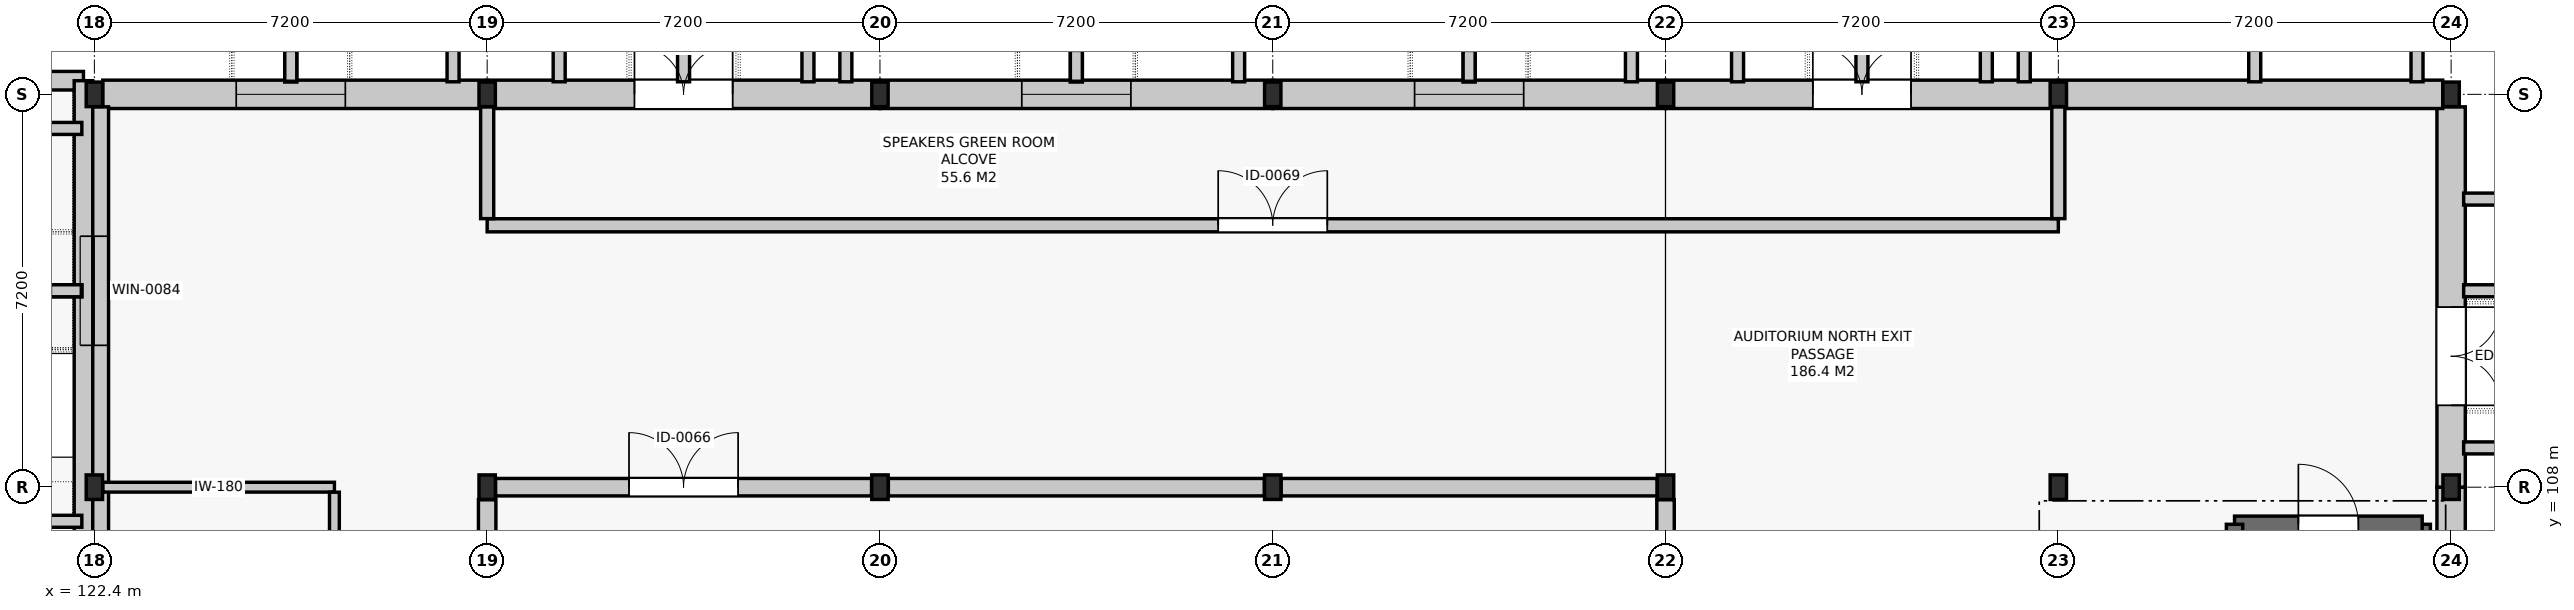
"""IFC4 building model, lengths in metres.
Left out: names, types, materials, properties, quantities, classifications, styles, units other than length and angle.
Written with IfcOpenShell. Run it as: python <this file> out.ifc"""

import sys

from ifc_helpers import new_model, si_unit, direction, frame, frame_2d, origin, origin_2d, place, context, subcontext, project, spatial, rectangle, i_section, extrude, element, fill, save


model = new_model("IFC4")
c1 = context("Model", 3, precision=1e-05, world=origin(), true_north=direction((0.0, 1.0)))
c2 = subcontext(c1, "Body", "Model", "MODEL_VIEW")
j1 = project(units=[si_unit("LENGTHUNIT", "METRE"), si_unit("PLANEANGLEUNIT", "RADIAN")], contexts=[c1])
p1 = place(None, origin())
s1 = spatial("IfcSite", under=j1, at=p1, CompositionType="ELEMENT")
p2 = place(p1, origin())
s2 = spatial("IfcBuilding", under=s1, at=p2, CompositionType="ELEMENT")
p3 = place(p2, origin())
s3 = spatial("IfcBuildingStorey", under=s2, at=p3, CompositionType="ELEMENT", Elevation=0.0)
for number, where, z_axis, x_axis in (
    (1, (122.4, 108.0, 0.0), (0.0, 0.0, 1.0), (1.0, 0.0, 0.0)),
    (2, (122.4, 115.2, 0.0), (0.0, 0.0, 1.0), (1.0, 0.0, 0.0)),
    (3, (129.6, 108.0, 0.0), (0.0, 0.0, 1.0), (1.0, 0.0, 0.0)),
    (4, (129.6, 115.2, 0.0), (0.0, 0.0, 1.0), (1.0, 0.0, 0.0)),
    (5, (136.8, 108.0, 0.0), (0.0, 0.0, 1.0), (1.0, 0.0, 0.0)),
    (6, (136.8, 115.2, 0.0), (0.0, 0.0, 1.0), (1.0, 0.0, 0.0)),
    (7, (144.0, 108.0, 0.0), (0.0, 0.0, 1.0), (1.0, 0.0, 0.0)),
    (8, (144.0, 115.2, 0.0), (0.0, 0.0, 1.0), (1.0, 0.0, 0.0)),
    (9, (151.2, 108.0, 0.0), (0.0, 0.0, 1.0), (1.0, 0.0, 0.0)),
    (10, (151.2, 115.2, 0.0), (0.0, 0.0, 1.0), (1.0, 0.0, 0.0)),
    (11, (158.4, 108.0, 0.0), (0.0, 0.0, 1.0), (1.0, 0.0, 0.0)),
    (12, (158.4, 115.2, 0.0), (0.0, 0.0, 1.0), (1.0, 0.0, 0.0)),
    (13, (165.6, 108.0, 0.0), (0.0, 0.0, 1.0), (1.0, 0.0, 0.0)),
    (14, (165.6, 115.2, 0.0), (0.0, 0.0, 1.0), (1.0, 0.0, 0.0)),
):
    element("IfcColumn", number, at=place(p3, frame(where, z_axis=z_axis, x_axis=x_axis)), inside=s3, PredefinedType="COLUMN", context=c2, shape_type="SweptSolid", body=[
        extrude(i_section(OverallWidth=0.3, OverallDepth=0.45, WebThickness=0.014, FlangeThickness=0.026, FilletRadius=0.027, at=origin_2d()), origin(), (0.0, 0.0, 1.0), 5.4),
    ])
p4 = place(p3, frame((165.6, 100.8, 0.0), z_axis=(0.0, 0.0, 1.0), x_axis=(0.0, 1.0, 0.0)))
e15 = element("IfcWall", 15, at=p4, inside=s3, PredefinedType="SOLIDWALL", context=c2, shape_type="SweptSolid", body=[
    extrude(rectangle(XDim=7.2, YDim=0.52, at=frame_2d((3.6, 0.0))), origin(), (0.0, 0.0, 1.0), 4.4),
])
p5 = place(p4, frame((2.6, 0.0, 1.35)))
e16 = element("IfcOpeningElement", 16, at=p5, cuts=e15, PredefinedType="OPENING", context=c2, shape_type="SweptSolid", body=[
    extrude(rectangle(XDim=2.0, YDim=1.5, at=frame_2d((1.0, 0.75))), frame((0.0, 0.272, 0.0), z_axis=(0.0, -1.0, 0.0), x_axis=(1.0, 0.0, 0.0)), (0.0, 0.0, 1.0), 0.544),
])
p6 = place(p3, frame((165.6, 108.0, 0.0), z_axis=(0.0, 0.0, 1.0), x_axis=(0.0, 1.0, 0.0)))
e17 = element("IfcWall", 17, at=p6, inside=s3, PredefinedType="SOLIDWALL", context=c2, shape_type="SweptSolid", body=[
    extrude(rectangle(XDim=6.971, YDim=0.52, at=frame_2d((3.485, 0.0))), origin(), (0.0, 0.0, 1.0), 4.4),
])
p7 = place(p6, frame((1.5, 0.0, 0.0)))
e18 = element("IfcOpeningElement", 18, at=p7, cuts=e17, PredefinedType="OPENING", context=c2, shape_type="SweptSolid", body=[
    extrude(rectangle(XDim=1.8, YDim=2.2, at=frame_2d((0.9, 1.1))), frame((0.0, 0.272, 0.0), z_axis=(0.0, -1.0, 0.0), x_axis=(1.0, 0.0, 0.0)), (0.0, 0.0, 1.0), 0.544),
])
p8 = place(p3, frame((165.446, 115.2, 0.0), z_axis=(0.0, 0.0, 1.0), x_axis=(-1.0, 0.0, 0.0)))
e19 = element("IfcWall", 19, at=p8, inside=s3, PredefinedType="SOLIDWALL", context=c2, shape_type="SweptSolid", body=[
    extrude(rectangle(XDim=7.046, YDim=0.52, at=frame_2d((3.523, 0.0))), origin(), (0.0, 0.0, 1.0), 4.4),
])
p9 = place(p3, frame((158.4, 115.2, 0.0), z_axis=(0.0, 0.0, 1.0), x_axis=(-1.0, 0.0, 0.0)))
e20 = element("IfcWall", 20, at=p9, inside=s3, PredefinedType="SOLIDWALL", context=c2, shape_type="SweptSolid", body=[
    extrude(rectangle(XDim=7.2, YDim=0.52, at=frame_2d((3.6, 0.0))), origin(), (0.0, 0.0, 1.0), 4.4),
])
p10 = place(p9, frame((2.7, 0.0, 0.0)))
e21 = element("IfcOpeningElement", 21, at=p10, cuts=e20, PredefinedType="OPENING", context=c2, shape_type="SweptSolid", body=[
    extrude(rectangle(XDim=1.8, YDim=2.2, at=frame_2d((0.9, 1.1))), frame((0.0, 0.272, 0.0), z_axis=(0.0, -1.0, 0.0), x_axis=(1.0, 0.0, 0.0)), (0.0, 0.0, 1.0), 0.544),
])
p11 = place(p3, frame((151.2, 115.2, 0.0), z_axis=(0.0, 0.0, 1.0), x_axis=(-1.0, 0.0, 0.0)))
e22 = element("IfcWall", 22, at=p11, inside=s3, PredefinedType="SOLIDWALL", context=c2, shape_type="SweptSolid", body=[
    extrude(rectangle(XDim=7.2, YDim=0.52, at=frame_2d((3.6, 0.0))), origin(), (0.0, 0.0, 1.0), 4.4),
])
p12 = place(p11, frame((2.6, 0.0, 1.35)))
e23 = element("IfcOpeningElement", 23, at=p12, cuts=e22, PredefinedType="OPENING", context=c2, shape_type="SweptSolid", body=[
    extrude(rectangle(XDim=2.0, YDim=1.5, at=frame_2d((1.0, 0.75))), frame((0.0, 0.272, 0.0), z_axis=(0.0, -1.0, 0.0), x_axis=(1.0, 0.0, 0.0)), (0.0, 0.0, 1.0), 0.544),
])
p13 = place(p3, frame((144.0, 115.2, 0.0), z_axis=(0.0, 0.0, 1.0), x_axis=(-1.0, 0.0, 0.0)))
e24 = element("IfcWall", 24, at=p13, inside=s3, PredefinedType="SOLIDWALL", context=c2, shape_type="SweptSolid", body=[
    extrude(rectangle(XDim=7.2, YDim=0.52, at=frame_2d((3.6, 0.0))), origin(), (0.0, 0.0, 1.0), 4.4),
])
p14 = place(p13, frame((2.6, 0.0, 1.35)))
e25 = element("IfcOpeningElement", 25, at=p14, cuts=e24, PredefinedType="OPENING", context=c2, shape_type="SweptSolid", body=[
    extrude(rectangle(XDim=2.0, YDim=1.5, at=frame_2d((1.0, 0.75))), frame((0.0, 0.272, 0.0), z_axis=(0.0, -1.0, 0.0), x_axis=(1.0, 0.0, 0.0)), (0.0, 0.0, 1.0), 0.544),
])
p15 = place(p3, frame((136.8, 115.2, 0.0), z_axis=(0.0, 0.0, 1.0), x_axis=(-1.0, 0.0, 0.0)))
e26 = element("IfcWall", 26, at=p15, inside=s3, PredefinedType="SOLIDWALL", context=c2, shape_type="SweptSolid", body=[
    extrude(rectangle(XDim=7.2, YDim=0.52, at=frame_2d((3.6, 0.0))), origin(), (0.0, 0.0, 1.0), 4.4),
])
p16 = place(p15, frame((2.7, 0.0, 0.0)))
e27 = element("IfcOpeningElement", 27, at=p16, cuts=e26, PredefinedType="OPENING", context=c2, shape_type="SweptSolid", body=[
    extrude(rectangle(XDim=1.8, YDim=2.2, at=frame_2d((0.9, 1.1))), frame((0.0, 0.272, 0.0), z_axis=(0.0, -1.0, 0.0), x_axis=(1.0, 0.0, 0.0)), (0.0, 0.0, 1.0), 0.544),
])
p17 = place(p3, frame((129.6, 115.2, 0.0), z_axis=(0.0, 0.0, 1.0), x_axis=(-1.0, 0.0, 0.0)))
e28 = element("IfcWall", 28, at=p17, inside=s3, PredefinedType="SOLIDWALL", context=c2, shape_type="SweptSolid", body=[
    extrude(rectangle(XDim=7.046, YDim=0.52, at=frame_2d((3.523, 0.0))), origin(), (0.0, 0.0, 1.0), 4.4),
])
p18 = place(p17, frame((2.6, 0.0, 1.35)))
e29 = element("IfcOpeningElement", 29, at=p18, cuts=e28, PredefinedType="OPENING", context=c2, shape_type="SweptSolid", body=[
    extrude(rectangle(XDim=2.0, YDim=1.5, at=frame_2d((1.0, 0.75))), frame((0.0, 0.272, 0.0), z_axis=(0.0, -1.0, 0.0), x_axis=(1.0, 0.0, 0.0)), (0.0, 0.0, 1.0), 0.544),
])
p19 = place(p3, frame((122.4, 114.971, 0.0), z_axis=(0.0, 0.0, 1.0), x_axis=(0.0, -1.0, 0.0)))
e30 = element("IfcWall", 30, at=p19, inside=s3, PredefinedType="SOLIDWALL", context=c2, shape_type="SweptSolid", body=[
    extrude(rectangle(XDim=6.971, YDim=0.52, at=frame_2d((3.485, 0.0))), origin(), (0.0, 0.0, 1.0), 4.4),
])
p20 = place(p19, frame((2.371, 0.0, 1.35)))
e31 = element("IfcOpeningElement", 31, at=p20, cuts=e30, PredefinedType="OPENING", context=c2, shape_type="SweptSolid", body=[
    extrude(rectangle(XDim=2.0, YDim=1.5, at=frame_2d((1.0, 0.75))), frame((0.0, 0.272, 0.0), z_axis=(0.0, -1.0, 0.0), x_axis=(1.0, 0.0, 0.0)), (0.0, 0.0, 1.0), 0.544),
])
p21 = place(p3, frame((122.4, 108.0, 0.0), z_axis=(0.0, 0.0, 1.0), x_axis=(0.0, -1.0, 0.0)))
e32 = element("IfcWall", 32, at=p21, inside=s3, PredefinedType="SOLIDWALL", context=c2, shape_type="SweptSolid", body=[
    extrude(rectangle(XDim=7.2, YDim=0.52, at=frame_2d((3.6, 0.0))), origin(), (0.0, 0.0, 1.0), 4.4),
])
p22 = place(p21, frame((2.6, 0.0, 1.35)))
e33 = element("IfcOpeningElement", 33, at=p22, cuts=e32, PredefinedType="OPENING", context=c2, shape_type="SweptSolid", body=[
    extrude(rectangle(XDim=2.0, YDim=1.5, at=frame_2d((1.0, 0.75))), frame((0.0, 0.272, 0.0), z_axis=(0.0, -1.0, 0.0), x_axis=(1.0, 0.0, 0.0)), (0.0, 0.0, 1.0), 0.544),
])
p23 = place(p3, frame((57.8, 115.45, -0.905), z_axis=(0.0, 0.0, 1.0), x_axis=(1.0, 0.0, 0.0)))
e34 = element("IfcWall", 34, at=p23, inside=s3, PredefinedType="SOLIDWALL", context=c2, shape_type="SweptSolid", body=[
    extrude(rectangle(XDim=64.4, YDim=0.34, at=frame_2d((32.2, 0.0))), origin(), (0.0, 0.0, 1.0), 0.225),
])
p24 = place(p3, frame((122.2, 86.6, -0.905), z_axis=(0.0, 0.0, 1.0), x_axis=(0.0, 1.0, 0.0)))
e35 = element("IfcWall", 35, at=p24, inside=s3, PredefinedType="SOLIDWALL", context=c2, shape_type="SweptSolid", body=[
    extrude(rectangle(XDim=28.85, YDim=0.34, at=frame_2d((14.425, 0.0))), origin(), (0.0, 0.0, 1.0), 0.905),
])
p25 = place(p3, frame((165.07, 100.38, 0.0), z_axis=(0.0, 0.0, 1.0), x_axis=(0.0, 1.0, 0.0)))
e36 = element("IfcWall", 36, at=p25, inside=s3, PredefinedType="SHEAR", context=c2, shape_type="SweptSolid", body=[
    extrude(rectangle(XDim=6.94, YDim=0.3, at=frame_2d((3.47, 0.0))), origin(), (0.0, 0.0, 1.0), 5.12),
])
p26 = place(p3, frame((165.07, 107.32, 0.0), z_axis=(0.0, 0.0, 1.0), x_axis=(-1.0, 0.0, 0.0)))
e37 = element("IfcWall", 37, at=p26, inside=s3, PredefinedType="SHEAR", context=c2, shape_type="SweptSolid", body=[
    extrude(rectangle(XDim=3.44, YDim=0.3, at=frame_2d((1.72, 0.0))), origin(), (0.0, 0.0, 1.0), 5.12),
])
p27 = place(p26, frame((1.17, 0.0, 0.0)))
e38 = element("IfcOpeningElement", 38, at=p27, cuts=e37, PredefinedType="OPENING", context=c2, shape_type="SweptSolid", body=[
    extrude(rectangle(XDim=1.1, YDim=2.15, at=frame_2d((0.55, 1.075))), frame((0.0, 0.162, 0.0), z_axis=(0.0, -1.0, 0.0), x_axis=(1.0, 0.0, 0.0)), (0.0, 0.0, 1.0), 0.324),
])
p28 = place(p3, frame((161.63, 107.32, 0.0), z_axis=(0.0, 0.0, 1.0), x_axis=(0.0, -1.0, 0.0)))
e39 = element("IfcWall", 39, at=p28, inside=s3, PredefinedType="SHEAR", context=c2, shape_type="SweptSolid", body=[
    extrude(rectangle(XDim=6.94, YDim=0.3, at=frame_2d((3.47, 0.0))), origin(), (0.0, 0.0, 1.0), 5.12),
])
p29 = place(p3, frame((129.754, 108.0, 0.0), z_axis=(0.0, 0.0, 1.0), x_axis=(1.0, 0.0, 0.0)))
e40 = element("IfcWall", 40, at=p29, inside=s3, PredefinedType="SOLIDWALL", context=c2, shape_type="SweptSolid", body=[
    extrude(rectangle(XDim=6.892, YDim=0.32, at=frame_2d((3.446, 0.0))), origin(), (0.0, 0.0, 1.0), 5.105),
])
p30 = place(p29, frame((2.446, 0.0, 0.0)))
e41 = element("IfcOpeningElement", 41, at=p30, cuts=e40, PredefinedType="OPENING", context=c2, shape_type="SweptSolid", body=[
    extrude(rectangle(XDim=2.0, YDim=2.4, at=frame_2d((1.0, 1.2))), frame((0.0, 0.172, 0.0), z_axis=(0.0, -1.0, 0.0), x_axis=(1.0, 0.0, 0.0)), (0.0, 0.0, 1.0), 0.344),
])
for number, where, z_axis, x_axis in (
    (42, (136.954, 108.0, 0.0), (0.0, 0.0, 1.0), (1.0, 0.0, 0.0)),
    (43, (144.154, 108.0, 0.0), (0.0, 0.0, 1.0), (1.0, 0.0, 0.0)),
):
    element("IfcWall", number, at=place(p3, frame(where, z_axis=z_axis, x_axis=x_axis)), inside=s3, PredefinedType="SOLIDWALL", context=c2, shape_type="SweptSolid", body=[
        extrude(rectangle(XDim=6.892, YDim=0.32, at=frame_2d((3.446, 0.0))), origin(), (0.0, 0.0, 1.0), 5.105),
    ])
p31 = place(p3, frame((122.554, 108.0, 0.0), z_axis=(0.0, 0.0, 1.0), x_axis=(1.0, 0.0, 0.0)))
e44 = element("IfcWall", 44, at=p31, inside=s3, PredefinedType="PARTITIONING", context=c2, shape_type="SweptSolid", body=[
    extrude(rectangle(XDim=4.246, YDim=0.18, at=frame_2d((2.123, 0.0))), origin(), (0.0, 0.0, 1.0), 4.615),
])
p32 = place(p3, frame((129.6, 112.8, 0.0), z_axis=(0.0, 0.0, 1.0), x_axis=(1.0, 0.0, 0.0)))
e45 = element("IfcWall", 45, at=p32, inside=s3, PredefinedType="SOLIDWALL", context=c2, shape_type="SweptSolid", body=[
    extrude(rectangle(XDim=28.8, YDim=0.24, at=frame_2d((14.4, 0.0))), origin(), (0.0, 0.0, 1.0), 4.665),
])
p33 = place(p32, frame((13.4, 0.0, 0.0)))
e46 = element("IfcOpeningElement", 46, at=p33, cuts=e45, PredefinedType="OPENING", context=c2, shape_type="SweptSolid", body=[
    extrude(rectangle(XDim=2.0, YDim=2.4, at=frame_2d((1.0, 1.2))), frame((0.0, 0.132, 0.0), z_axis=(0.0, -1.0, 0.0), x_axis=(1.0, 0.0, 0.0)), (0.0, 0.0, 1.0), 0.264),
])
for number, where, z_axis, x_axis in (
    (47, (129.6, 101.029, 0.0), (0.0, 0.0, 1.0), (0.0, 1.0, 0.0)),
    (48, (151.2, 101.029, 0.0), (0.0, 0.0, 1.0), (0.0, 1.0, 0.0)),
):
    element("IfcWall", number, at=place(p3, frame(where, z_axis=z_axis, x_axis=x_axis)), inside=s3, PredefinedType="SOLIDWALL", context=c2, shape_type="SweptSolid", body=[
        extrude(rectangle(XDim=6.742, YDim=0.32, at=frame_2d((3.371, 0.0))), origin(), (0.0, 0.0, 1.0), 5.105),
    ])
p34 = place(p3, frame((126.8, 99.477, 0.0), z_axis=(0.0, 0.0, 1.0), x_axis=(0.0, 1.0, 0.0)))
e49 = element("IfcWall", 49, at=p34, inside=s3, PredefinedType="PARTITIONING", context=c2, shape_type="SweptSolid", body=[
    extrude(rectangle(XDim=8.431, YDim=0.18, at=frame_2d((4.215, 0.0))), origin(), (0.0, 0.0, 1.0), 4.615),
])
p35 = place(p34, frame((3.515, 0.0, 0.0)))
e50 = element("IfcOpeningElement", 50, at=p35, cuts=e49, PredefinedType="OPENING", context=c2, shape_type="SweptSolid", body=[
    extrude(rectangle(XDim=1.4, YDim=2.2, at=frame_2d((0.7, 1.1))), frame((0.0, 0.102, 0.0), z_axis=(0.0, -1.0, 0.0), x_axis=(1.0, 0.0, 0.0)), (0.0, 0.0, 1.0), 0.204),
])
for number, where, z_axis, x_axis in (
    (51, (129.6, 112.922, 0.0), (0.0, 0.0, 1.0), (0.0, 1.0, 0.0)),
    (52, (158.4, 112.922, 0.0), (0.0, 0.0, 1.0), (0.0, 1.0, 0.0)),
):
    element("IfcWall", number, at=place(p3, frame(where, z_axis=z_axis, x_axis=x_axis)), inside=s3, PredefinedType="SOLIDWALL", context=c2, shape_type="SweptSolid", body=[
        extrude(rectangle(XDim=2.049, YDim=0.24, at=frame_2d((1.024, 0.0))), origin(), (0.0, 0.0, 1.0), 4.665),
    ])
p36 = place(p7, frame((1.8, 0.0, 0.0), z_axis=(0.0, 0.0, 1.0), x_axis=(-1.0, 0.0, 0.0)))
e53 = element("IfcDoor", 53, at=p36, inside=s3, OperationType="DOUBLE_DOOR_SINGLE_SWING", PredefinedType="DOOR", context=c2, shape_type="SweptSolid", body=[
    extrude(rectangle(XDim=1.8, YDim=2.2, at=frame_2d((0.9, 1.1))), frame((0.0, 0.025, 0.0), z_axis=(0.0, -1.0, 0.0), x_axis=(1.0, 0.0, 0.0)), (0.0, 0.0, 1.0), 0.05),
])
fill(e18, e53)
p37 = place(p10, frame((1.8, 0.0, 0.0), z_axis=(0.0, 0.0, 1.0), x_axis=(-1.0, 0.0, 0.0)))
e54 = element("IfcDoor", 54, at=p37, inside=s3, OperationType="DOUBLE_DOOR_SINGLE_SWING", PredefinedType="DOOR", context=c2, shape_type="SweptSolid", body=[
    extrude(rectangle(XDim=1.8, YDim=2.2, at=frame_2d((0.9, 1.1))), frame((0.0, 0.025, 0.0), z_axis=(0.0, -1.0, 0.0), x_axis=(1.0, 0.0, 0.0)), (0.0, 0.0, 1.0), 0.05),
])
fill(e21, e54)
p38 = place(p12, origin())
e55 = element("IfcWindow", 55, at=p38, inside=s3, PartitioningType="SINGLE_PANEL", PredefinedType="WINDOW", context=c2, shape_type="SweptSolid", body=[
    extrude(rectangle(XDim=2.0, YDim=1.5, at=frame_2d((1.0, 0.75))), frame((0.0, 0.03, 0.0), z_axis=(0.0, -1.0, 0.0), x_axis=(1.0, 0.0, 0.0)), (0.0, 0.0, 1.0), 0.06),
])
fill(e23, e55)
p39 = place(p14, origin())
e56 = element("IfcWindow", 56, at=p39, inside=s3, PartitioningType="SINGLE_PANEL", PredefinedType="WINDOW", context=c2, shape_type="SweptSolid", body=[
    extrude(rectangle(XDim=2.0, YDim=1.5, at=frame_2d((1.0, 0.75))), frame((0.0, 0.03, 0.0), z_axis=(0.0, -1.0, 0.0), x_axis=(1.0, 0.0, 0.0)), (0.0, 0.0, 1.0), 0.06),
])
fill(e25, e56)
p40 = place(p16, frame((1.8, 0.0, 0.0), z_axis=(0.0, 0.0, 1.0), x_axis=(-1.0, 0.0, 0.0)))
e57 = element("IfcDoor", 57, at=p40, inside=s3, OperationType="DOUBLE_DOOR_SINGLE_SWING", PredefinedType="DOOR", context=c2, shape_type="SweptSolid", body=[
    extrude(rectangle(XDim=1.8, YDim=2.2, at=frame_2d((0.9, 1.1))), frame((0.0, 0.025, 0.0), z_axis=(0.0, -1.0, 0.0), x_axis=(1.0, 0.0, 0.0)), (0.0, 0.0, 1.0), 0.05),
])
fill(e27, e57)
p41 = place(p18, origin())
e58 = element("IfcWindow", 58, at=p41, inside=s3, PartitioningType="SINGLE_PANEL", PredefinedType="WINDOW", context=c2, shape_type="SweptSolid", body=[
    extrude(rectangle(XDim=2.0, YDim=1.5, at=frame_2d((1.0, 0.75))), frame((0.0, 0.03, 0.0), z_axis=(0.0, -1.0, 0.0), x_axis=(1.0, 0.0, 0.0)), (0.0, 0.0, 1.0), 0.06),
])
fill(e29, e58)
p42 = place(p20, origin())
e59 = element("IfcWindow", 59, at=p42, inside=s3, PartitioningType="SINGLE_PANEL", PredefinedType="WINDOW", context=c2, shape_type="SweptSolid", body=[
    extrude(rectangle(XDim=2.0, YDim=1.5, at=frame_2d((1.0, 0.75))), frame((0.0, 0.03, 0.0), z_axis=(0.0, -1.0, 0.0), x_axis=(1.0, 0.0, 0.0)), (0.0, 0.0, 1.0), 0.06),
])
fill(e31, e59)
p43 = place(p27, frame((1.1, 0.0, 0.0), z_axis=(0.0, 0.0, 1.0), x_axis=(-1.0, 0.0, 0.0)))
e60 = element("IfcDoor", 60, at=p43, inside=s3, OperationType="SINGLE_SWING_LEFT", PredefinedType="DOOR", context=c2, shape_type="SweptSolid", body=[
    extrude(rectangle(XDim=1.1, YDim=2.15, at=frame_2d((0.55, 1.075))), frame((0.0, 0.025, 0.0), z_axis=(0.0, -1.0, 0.0), x_axis=(1.0, 0.0, 0.0)), (0.0, 0.0, 1.0), 0.05),
])
fill(e38, e60)
p44 = place(p30, origin())
e61 = element("IfcDoor", 61, at=p44, inside=s3, OperationType="DOUBLE_DOOR_SINGLE_SWING", PredefinedType="DOOR", context=c2, shape_type="SweptSolid", body=[
    extrude(rectangle(XDim=2.0, YDim=2.4, at=frame_2d((1.0, 1.2))), frame((0.0, 0.025, 0.0), z_axis=(0.0, -1.0, 0.0), x_axis=(1.0, 0.0, 0.0)), (0.0, 0.0, 1.0), 0.05),
])
fill(e41, e61)
p45 = place(p33, origin())
e62 = element("IfcDoor", 62, at=p45, inside=s3, OperationType="DOUBLE_DOOR_SINGLE_SWING", PredefinedType="DOOR", context=c2, shape_type="SweptSolid", body=[
    extrude(rectangle(XDim=2.0, YDim=2.4, at=frame_2d((1.0, 1.2))), frame((0.0, 0.025, 0.0), z_axis=(0.0, -1.0, 0.0), x_axis=(1.0, 0.0, 0.0)), (0.0, 0.0, 1.0), 0.05),
])
fill(e46, e62)
save(model, sys.argv[1])
